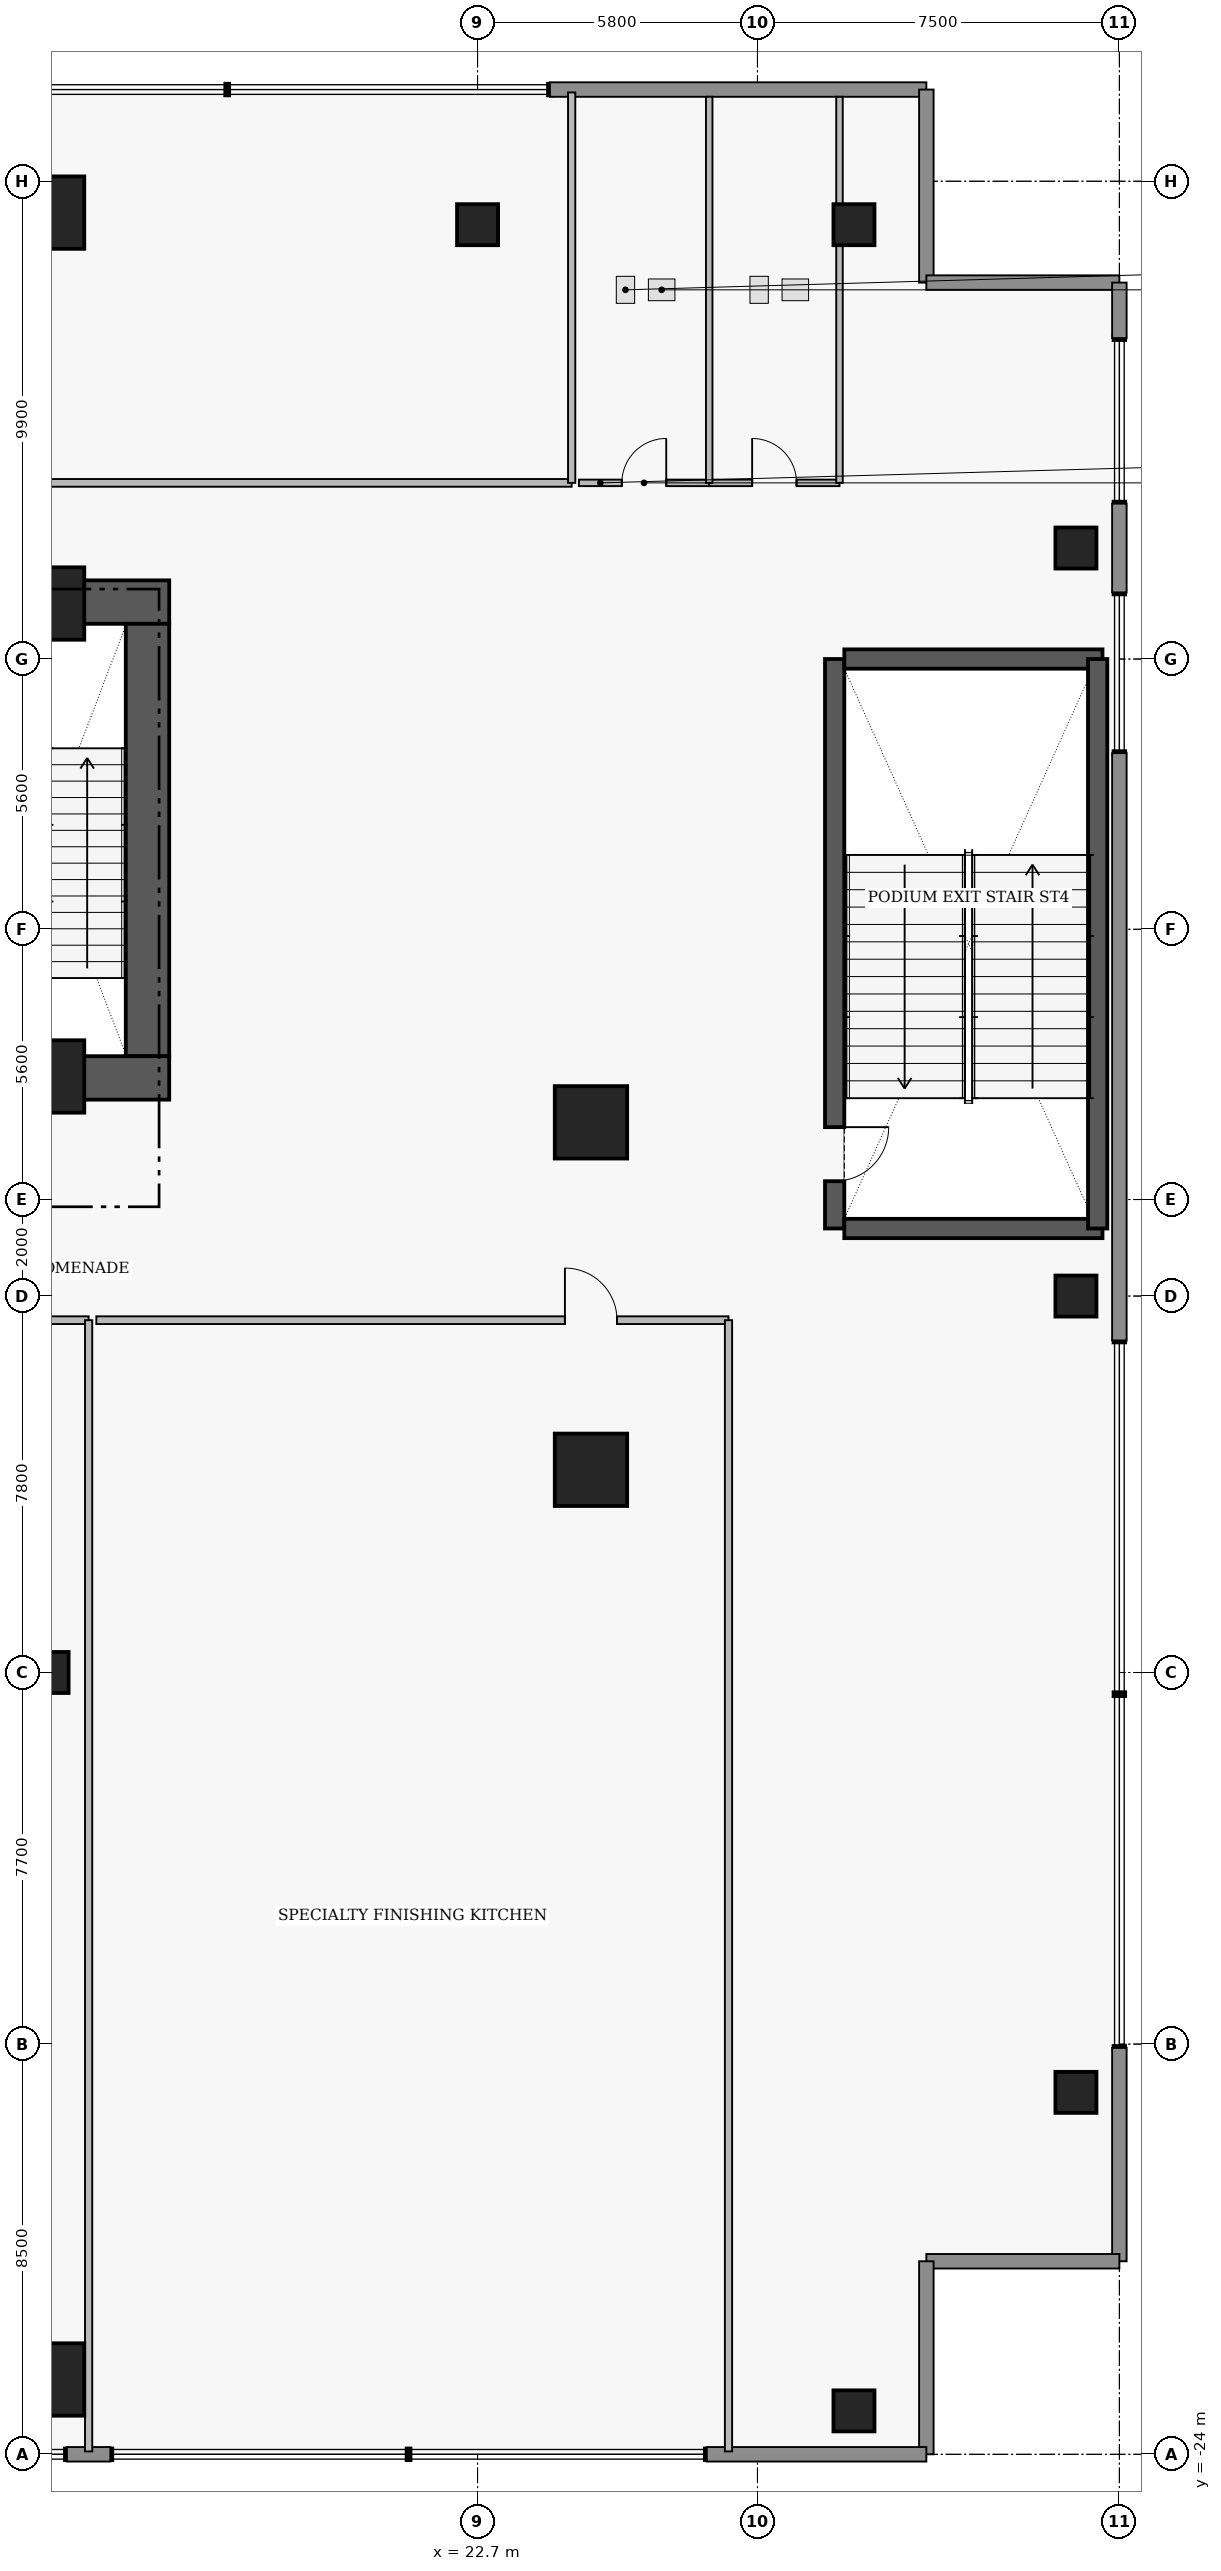
"""IFC4 building model, lengths in metres.
Left out: names, types, materials, properties, quantities, classifications, styles, units other than length and angle.
Written with IfcOpenShell. Run it as: python <this file> out.ifc"""

import sys

from ifc_helpers import new_model, si_unit, direction, frame, frame_2d, origin, origin_2d, place, context, subcontext, project, spatial, rectangle, extrude, element, fill, save


model = new_model("IFC4")
c1 = context("Model", 3, precision=1e-05, world=origin(), true_north=direction((0.0, 1.0)))
c2 = subcontext(c1, "Body", "Model", "MODEL_VIEW")
j1 = project(units=[si_unit("LENGTHUNIT", "METRE"), si_unit("PLANEANGLEUNIT", "RADIAN")], contexts=[c1])
p1 = place(None, origin())
s1 = spatial("IfcSite", under=j1, at=p1, CompositionType="ELEMENT")
p2 = place(p1, origin())
s2 = spatial("IfcBuilding", under=s1, at=p2, CompositionType="ELEMENT")
p3 = place(p2, frame((0.0, 0.0, 6.0)))
s3 = spatial("IfcBuildingStorey", under=s2, at=p3, CompositionType="ELEMENT", Elevation=6.0)
p4 = place(p3, frame((11.6, 14.38, 0.0), z_axis=(0.0, 0.0, 1.0), x_axis=(1.0, 0.0, 0.0)))
e1 = element("IfcWall", 1, at=p4, inside=s3, PredefinedType="SHEAR", context=c2, shape_type="SweptSolid", body=[
    extrude(rectangle(XDim=4.71, YDim=0.9, at=frame_2d((2.355, 0.0))), origin(), (0.0, 0.0, 1.0), 5.21),
])
p5 = place(p3, frame((15.86, 4.97, 0.0), z_axis=(0.0, 0.0, 1.0), x_axis=(0.0, 1.0, 0.0)))
e2 = element("IfcWall", 2, at=p5, inside=s3, PredefinedType="SHEAR", context=c2, shape_type="SweptSolid", body=[
    extrude(rectangle(XDim=8.96, YDim=0.9, at=frame_2d((4.48, 0.0))), origin(), (0.0, 0.0, 1.0), 5.21),
])
p6 = place(p3, frame((11.6, 4.52, 0.0), z_axis=(0.0, 0.0, 1.0), x_axis=(1.0, 0.0, 0.0)))
e3 = element("IfcWall", 3, at=p6, inside=s3, PredefinedType="SHEAR", context=c2, shape_type="SweptSolid", body=[
    extrude(rectangle(XDim=4.71, YDim=0.9, at=frame_2d((2.355, 0.0))), origin(), (0.0, 0.0, 1.0), 5.21),
])
p7 = place(p3, frame((30.1, 13.2, 0.0), z_axis=(0.0, 0.0, 1.0), x_axis=(0.0, -1.0, 0.0)))
e4 = element("IfcWall", 4, at=p7, inside=s3, PredefinedType="SHEAR", context=c2, shape_type="SweptSolid", body=[
    extrude(rectangle(XDim=11.8, YDim=0.4, at=frame_2d((5.9, 0.0))), origin(), (0.0, 0.0, 1.0), 5.21),
])
p8 = place(p7, frame((9.7, 0.0, 0.0)))
e5 = element("IfcOpeningElement", 5, at=p8, cuts=e4, PredefinedType="OPENING", context=c2, shape_type="SweptSolid", body=[
    extrude(rectangle(XDim=1.12, YDim=2.22, at=frame_2d((0.56, 1.11))), frame((0.0, 0.21, 0.0), z_axis=(0.0, -1.0, 0.0), x_axis=(1.0, 0.0, 0.0)), (0.0, 0.0, 1.0), 0.42),
])
for number, where, z_axis, x_axis in (
    (6, (30.3, 1.4, 0.0), (0.0, 0.0, 1.0), (1.0, 0.0, 0.0)),
    (7, (30.3, 13.2, 0.0), (0.0, 0.0, 1.0), (1.0, 0.0, 0.0)),
):
    element("IfcWall", number, at=place(p3, frame(where, z_axis=z_axis, x_axis=x_axis)), inside=s3, PredefinedType="SHEAR", context=c2, shape_type="SweptSolid", body=[
        extrude(rectangle(XDim=5.35, YDim=0.4, at=frame_2d((2.675, 0.0))), origin(), (0.0, 0.0, 1.0), 5.21),
    ])
p9 = place(p3, frame((35.55, 1.4, 0.0), z_axis=(0.0, 0.0, 1.0), x_axis=(0.0, 1.0, 0.0)))
e8 = element("IfcWall", 8, at=p9, inside=s3, PredefinedType="SHEAR", context=c2, shape_type="SweptSolid", body=[
    extrude(rectangle(XDim=11.8, YDim=0.4, at=frame_2d((5.9, 0.0))), origin(), (0.0, 0.0, 1.0), 5.21),
])
for number, where, z_axis, x_axis in (
    (9, (13.8, 14.35, 0.0), (0.0, 0.0, 1.0), (1.0, 0.0, 0.0)),
    (10, (13.8, 4.55, 0.0), (0.0, 0.0, 1.0), (1.0, 0.0, 0.0)),
    (11, (13.8, -22.45, 0.0), (0.0, 0.0, 1.0), (1.0, 0.0, 0.0)),
    (12, (13.8, 22.45, 0.0), (0.0, 0.0, 1.0), (1.0, 0.0, 0.0)),
    (13, (25.05, -3.6, 0.0), (0.0, 0.0, 1.0), (1.0, 0.0, 0.0)),
    (14, (25.05, 3.6, 0.0), (0.0, 0.0, 1.0), (1.0, 0.0, 0.0)),
):
    element("IfcColumn", number, at=place(p3, frame(where, z_axis=z_axis, x_axis=x_axis)), inside=s3, PredefinedType="COLUMN", context=c2, shape_type="SweptSolid", body=[
        extrude(rectangle(XDim=1.5, YDim=1.5, at=origin_2d()), origin(), (0.0, 0.0, 1.0), 5.4),
    ])
for number, where, z_axis, x_axis in (
    (15, (30.5, -23.1, 0.0), (0.0, 0.0, 1.0), (1.0, 0.0, 0.0)),
    (16, (30.5, 22.2, 0.0), (0.0, 0.0, 1.0), (1.0, 0.0, 0.0)),
    (17, (35.1, -16.5, 0.0), (0.0, 0.0, 1.0), (1.0, 0.0, 0.0)),
    (18, (35.1, 0.0, 0.0), (0.0, 0.0, 1.0), (1.0, 0.0, 0.0)),
    (19, (35.1, 15.5, 0.0), (0.0, 0.0, 1.0), (1.0, 0.0, 0.0)),
    (20, (22.7, 22.2, 0.0), (0.0, 0.0, 1.0), (1.0, 0.0, 0.0)),
    (21, (13.8, -7.8, 0.0), (0.0, 0.0, 1.0), (1.0, 0.0, 0.0)),
):
    element("IfcColumn", number, at=place(p3, frame(where, z_axis=z_axis, x_axis=x_axis)), inside=s3, PredefinedType="COLUMN", context=c2, shape_type="SweptSolid", body=[
        extrude(rectangle(XDim=0.85, YDim=0.85, at=origin_2d()), origin(), (0.0, 0.0, 1.0), 5.4),
    ])
p10 = place(p3, frame((24.2, 25.0, 0.0), z_axis=(0.0, 0.0, 1.0), x_axis=(1.0, 0.0, 0.0)))
e22 = element("IfcWall", 22, at=p10, inside=s3, PredefinedType="STANDARD", context=c2, shape_type="SweptSolid", body=[
    extrude(rectangle(XDim=7.8, YDim=0.3, at=frame_2d((3.9, 0.0))), origin(), (0.0, 0.0, 1.0), 5.14),
])
for number, where, z_axis, x_axis in (
    (23, (32.0, 25.0, 0.0), (0.0, 0.0, 1.0), (0.0, -1.0, 0.0)),
    (24, (32.0, 21.0, 0.0), (0.0, 0.0, 1.0), (1.0, 0.0, 0.0)),
):
    element("IfcWall", number, at=place(p3, frame(where, z_axis=z_axis, x_axis=x_axis)), inside=s3, PredefinedType="STANDARD", context=c2, shape_type="SweptSolid", body=[
        extrude(rectangle(XDim=4.0, YDim=0.3, at=frame_2d((2.0, 0.0))), origin(), (0.0, 0.0, 1.0), 5.14),
    ])
p11 = place(p3, frame((36.0, 21.0, 0.0), z_axis=(0.0, 0.0, 1.0), x_axis=(0.0, -1.0, 0.0)))
e25 = element("IfcWall", 25, at=p11, inside=s3, PredefinedType="STANDARD", context=c2, shape_type="SweptSolid", body=[
    extrude(rectangle(XDim=1.15, YDim=0.3, at=frame_2d((0.575, 0.0))), origin(), (0.0, 0.0, 1.0), 5.14),
])
p12 = place(p3, frame((36.0, 16.42, 0.0), z_axis=(0.0, 0.0, 1.0), x_axis=(0.0, -1.0, 0.0)))
e26 = element("IfcWall", 26, at=p12, inside=s3, PredefinedType="STANDARD", context=c2, shape_type="SweptSolid", body=[
    extrude(rectangle(XDim=1.84, YDim=0.3, at=frame_2d((0.92, 0.0))), origin(), (0.0, 0.0, 1.0), 5.14),
])
p13 = place(p3, frame((36.0, 11.25, 0.0), z_axis=(0.0, 0.0, 1.0), x_axis=(0.0, -1.0, 0.0)))
e27 = element("IfcWall", 27, at=p13, inside=s3, PredefinedType="STANDARD", context=c2, shape_type="SweptSolid", body=[
    extrude(rectangle(XDim=12.17, YDim=0.3, at=frame_2d((6.085, 0.0))), origin(), (0.0, 0.0, 1.0), 5.14),
])
p14 = place(p3, frame((36.0, -15.58, 0.0), z_axis=(0.0, 0.0, 1.0), x_axis=(0.0, -1.0, 0.0)))
e28 = element("IfcWall", 28, at=p14, inside=s3, PredefinedType="STANDARD", context=c2, shape_type="SweptSolid", body=[
    extrude(rectangle(XDim=4.42, YDim=0.3, at=frame_2d((2.21, 0.0))), origin(), (0.0, 0.0, 1.0), 5.14),
])
for number, where, z_axis, x_axis in (
    (29, (36.0, -20.0, 0.0), (0.0, 0.0, 1.0), (-1.0, 0.0, 0.0)),
    (30, (32.0, -20.0, 0.0), (0.0, 0.0, 1.0), (0.0, -1.0, 0.0)),
):
    element("IfcWall", number, at=place(p3, frame(where, z_axis=z_axis, x_axis=x_axis)), inside=s3, PredefinedType="STANDARD", context=c2, shape_type="SweptSolid", body=[
        extrude(rectangle(XDim=4.0, YDim=0.3, at=frame_2d((2.0, 0.0))), origin(), (0.0, 0.0, 1.0), 5.14),
    ])
p15 = place(p3, frame((32.0, -24.0, 0.0), z_axis=(0.0, 0.0, 1.0), x_axis=(-1.0, 0.0, 0.0)))
e31 = element("IfcWall", 31, at=p15, inside=s3, PredefinedType="STANDARD", context=c2, shape_type="SweptSolid", body=[
    extrude(rectangle(XDim=4.55, YDim=0.3, at=frame_2d((2.275, 0.0))), origin(), (0.0, 0.0, 1.0), 5.14),
])
p16 = place(p3, frame((15.09, -24.0, 0.0), z_axis=(0.0, 0.0, 1.0), x_axis=(-1.0, 0.0, 0.0)))
e32 = element("IfcWall", 32, at=p16, inside=s3, PredefinedType="STANDARD", context=c2, shape_type="SweptSolid", body=[
    extrude(rectangle(XDim=0.9, YDim=0.3, at=frame_2d((0.45, 0.0))), origin(), (0.0, 0.0, 1.0), 5.14),
])
p17 = place(p3, frame((-2.84, 16.85, 0.0), z_axis=(0.0, 0.0, 1.0), x_axis=(1.0, 0.0, 0.0)))
e33 = element("IfcWall", 33, at=p17, inside=s3, PredefinedType="PARTITIONING", context=c2, shape_type="SweptSolid", body=[
    extrude(rectangle(XDim=27.49, YDim=0.16, at=frame_2d((13.745, 0.0))), origin(), (0.0, 0.0, 1.0), 4.607),
])
p18 = place(p17, frame((13.205, 0.0, 0.0)))
e34 = element("IfcOpeningElement", 34, at=p18, cuts=e33, PredefinedType="OPENING", context=c2, shape_type="SweptSolid", body=[
    extrude(rectangle(XDim=1.08, YDim=2.18, at=frame_2d((0.54, 1.09))), frame((0.0, 0.09, 0.0), z_axis=(0.0, -1.0, 0.0), x_axis=(1.0, 0.0, 0.0)), (0.0, 0.0, 1.0), 0.18),
])
p19 = place(p3, frame((-14.64, -0.5, 0.0), z_axis=(0.0, 0.0, 1.0), x_axis=(1.0, 0.0, 0.0)))
e35 = element("IfcWall", 35, at=p19, inside=s3, PredefinedType="PARTITIONING", context=c2, shape_type="SweptSolid", body=[
    extrude(rectangle(XDim=29.28, YDim=0.16, at=frame_2d((14.64, 0.0))), origin(), (0.0, 0.0, 1.0), 5.14),
])
p20 = place(p19, frame((14.1, 0.0, 0.0)))
e36 = element("IfcOpeningElement", 36, at=p20, cuts=e35, PredefinedType="OPENING", context=c2, shape_type="SweptSolid", body=[
    extrude(rectangle(XDim=1.08, YDim=2.18, at=frame_2d((0.54, 1.09))), frame((0.0, 0.09, 0.0), z_axis=(0.0, -1.0, 0.0), x_axis=(1.0, 0.0, 0.0)), (0.0, 0.0, 1.0), 0.18),
])
p21 = place(p3, frame((14.8, -0.5, 0.0), z_axis=(0.0, 0.0, 1.0), x_axis=(1.0, 0.0, 0.0)))
e37 = element("IfcWall", 37, at=p21, inside=s3, PredefinedType="PARTITIONING", context=c2, shape_type="SweptSolid", body=[
    extrude(rectangle(XDim=13.1, YDim=0.16, at=frame_2d((6.55, 0.0))), origin(), (0.0, 0.0, 1.0), 5.14),
])
p22 = place(p21, frame((9.71, 0.0, 0.0)))
e38 = element("IfcOpeningElement", 38, at=p22, cuts=e37, PredefinedType="OPENING", context=c2, shape_type="SweptSolid", body=[
    extrude(rectangle(XDim=1.08, YDim=2.18, at=frame_2d((0.54, 1.09))), frame((0.0, 0.09, 0.0), z_axis=(0.0, -1.0, 0.0), x_axis=(1.0, 0.0, 0.0)), (0.0, 0.0, 1.0), 0.18),
])
p23 = place(p3, frame((24.8, 16.85, 0.0), z_axis=(0.0, 0.0, 1.0), x_axis=(1.0, 0.0, 0.0)))
e39 = element("IfcWall", 39, at=p23, inside=s3, PredefinedType="PLUMBINGWALL", context=c2, shape_type="SweptSolid", body=[
    extrude(rectangle(XDim=2.7, YDim=0.135, at=frame_2d((1.35, 0.0))), origin(), (0.0, 0.0, 1.0), 5.14),
])
p24 = place(p23, frame((0.89, 0.0, 0.0)))
e40 = element("IfcOpeningElement", 40, at=p24, cuts=e39, PredefinedType="OPENING", context=c2, shape_type="SweptSolid", body=[
    extrude(rectangle(XDim=0.92, YDim=2.12, at=frame_2d((0.46, 1.06))), frame((0.0, 0.077, 0.0), z_axis=(0.0, -1.0, 0.0), x_axis=(1.0, 0.0, 0.0)), (0.0, 0.0, 1.0), 0.155),
])
p25 = place(p3, frame((27.5, 16.85, 0.0), z_axis=(0.0, 0.0, 1.0), x_axis=(1.0, 0.0, 0.0)))
e41 = element("IfcWall", 41, at=p25, inside=s3, PredefinedType="PLUMBINGWALL", context=c2, shape_type="SweptSolid", body=[
    extrude(rectangle(XDim=2.7, YDim=0.135, at=frame_2d((1.35, 0.0))), origin(), (0.0, 0.0, 1.0), 5.14),
])
p26 = place(p25, frame((0.89, 0.0, 0.0)))
e42 = element("IfcOpeningElement", 42, at=p26, cuts=e41, PredefinedType="OPENING", context=c2, shape_type="SweptSolid", body=[
    extrude(rectangle(XDim=0.92, YDim=2.12, at=frame_2d((0.46, 1.06))), frame((0.0, 0.077, 0.0), z_axis=(0.0, -1.0, 0.0), x_axis=(1.0, 0.0, 0.0)), (0.0, 0.0, 1.0), 0.155),
])
p27 = place(p3, frame((24.65, 16.85, 0.0), z_axis=(0.0, 0.0, 1.0), x_axis=(0.0, 1.0, 0.0)))
e43 = element("IfcWall", 43, at=p27, inside=s3, PredefinedType="PARTITIONING", context=c2, shape_type="SweptSolid", body=[
    extrude(rectangle(XDim=8.09, YDim=0.15, at=frame_2d((4.045, 0.0))), origin(), (0.0, 0.0, 1.0), 5.14),
])
for number, where, z_axis, x_axis in (
    (44, (14.64, -23.94, 0.0), (0.0, 0.0, 1.0), (0.0, 1.0, 0.0)),
    (45, (27.9, -23.94, 0.0), (0.0, 0.0, 1.0), (0.0, 1.0, 0.0)),
):
    element("IfcWall", number, at=place(p3, frame(where, z_axis=z_axis, x_axis=x_axis)), inside=s3, PredefinedType="PARTITIONING", context=c2, shape_type="SweptSolid", body=[
        extrude(rectangle(XDim=23.44, YDim=0.15, at=frame_2d((11.72, 0.0))), origin(), (0.0, 0.0, 1.0), 5.14),
    ])
for number, where, z_axis, x_axis in (
    (46, (30.2, 16.85, 0.0), (0.0, 0.0, 1.0), (0.0, 1.0, 0.0)),
    (47, (27.5, 16.85, 0.0), (0.0, 0.0, 1.0), (0.0, 1.0, 0.0)),
):
    element("IfcWall", number, at=place(p3, frame(where, z_axis=z_axis, x_axis=x_axis)), inside=s3, PredefinedType="PLUMBINGWALL", context=c2, shape_type="SweptSolid", body=[
        extrude(rectangle(XDim=8.0, YDim=0.135, at=frame_2d((4.0, 0.0))), origin(), (0.0, 0.0, 1.0), 5.14),
    ])
p28 = place(p8, origin())
e48 = element("IfcDoor", 48, at=p28, inside=s3, OperationType="SINGLE_SWING_LEFT", PredefinedType="DOOR", context=c2, shape_type="SweptSolid", body=[
    extrude(rectangle(XDim=1.12, YDim=2.22, at=frame_2d((0.56, 1.11))), frame((0.0, 0.025, 0.0), z_axis=(0.0, -1.0, 0.0), x_axis=(1.0, 0.0, 0.0)), (0.0, 0.0, 1.0), 0.05),
])
fill(e5, e48)
p29 = place(p22, origin())
e49 = element("IfcDoor", 49, at=p29, inside=s3, OperationType="SINGLE_SWING_LEFT", PredefinedType="DOOR", context=c2, shape_type="SweptSolid", body=[
    extrude(rectangle(XDim=1.08, YDim=2.18, at=frame_2d((0.54, 1.09))), frame((0.0, 0.025, 0.0), z_axis=(0.0, -1.0, 0.0), x_axis=(1.0, 0.0, 0.0)), (0.0, 0.0, 1.0), 0.05),
])
fill(e38, e49)
p30 = place(p24, origin())
e50 = element("IfcDoor", 50, at=p30, inside=s3, OperationType="SINGLE_SWING_RIGHT", PredefinedType="DOOR", context=c2, shape_type="SweptSolid", body=[
    extrude(rectangle(XDim=0.92, YDim=2.12, at=frame_2d((0.46, 1.06))), frame((0.0, 0.025, 0.0), z_axis=(0.0, -1.0, 0.0), x_axis=(1.0, 0.0, 0.0)), (0.0, 0.0, 1.0), 0.05),
])
fill(e40, e50)
p31 = place(p26, origin())
e51 = element("IfcDoor", 51, at=p31, inside=s3, OperationType="SINGLE_SWING_LEFT", PredefinedType="DOOR", context=c2, shape_type="SweptSolid", body=[
    extrude(rectangle(XDim=0.92, YDim=2.12, at=frame_2d((0.46, 1.06))), frame((0.0, 0.025, 0.0), z_axis=(0.0, -1.0, 0.0), x_axis=(1.0, 0.0, 0.0)), (0.0, 0.0, 1.0), 0.05),
])
fill(e42, e51)
save(model, sys.argv[1])
